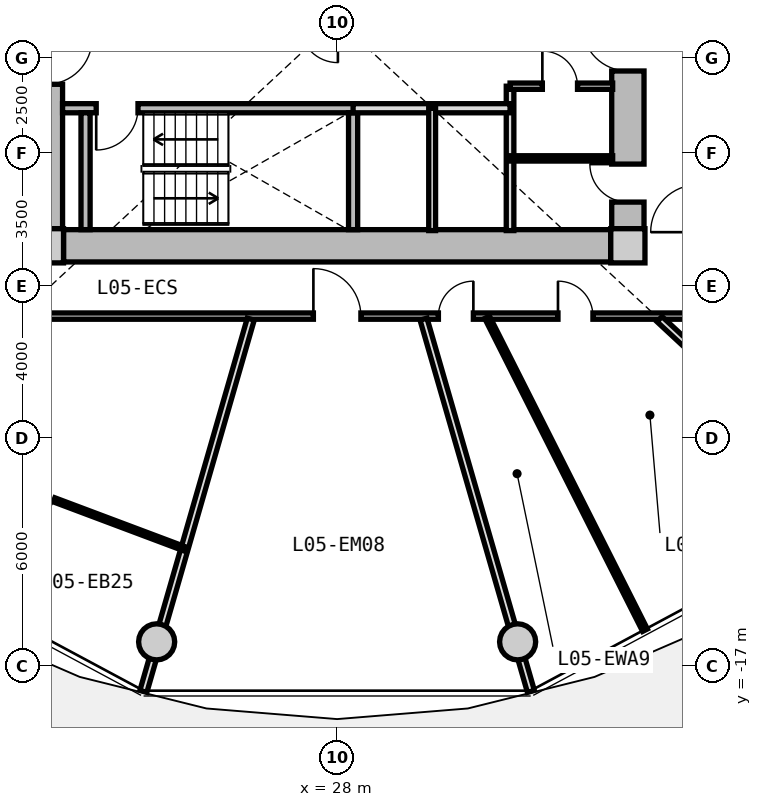
"""IFC4 building model, lengths in metres.
Left out: names, types, materials, properties, quantities, classifications, styles, units other than length and angle.
Written with IfcOpenShell. Run it as: python <this file> out.ifc"""

import sys

from ifc_helpers import new_model, si_unit, direction, frame, frame_2d, origin, origin_2d, place, context, subcontext, project, spatial, rectangle, circle, extrude, source, transform, mapped, element, fill, save


model = new_model("IFC4")
c1 = context("Model", 3, precision=1e-05, world=origin(), true_north=direction((0.0, 1.0)))
c2 = subcontext(c1, "Body", "Model", "MODEL_VIEW")
j1 = project(units=[si_unit("LENGTHUNIT", "METRE"), si_unit("PLANEANGLEUNIT", "RADIAN")], contexts=[c1])
p1 = place(None, origin())
s1 = spatial("IfcSite", under=j1, at=p1, CompositionType="ELEMENT")
p2 = place(p1, origin())
s2 = spatial("IfcBuilding", under=s1, at=p2, CompositionType="ELEMENT")
p3 = place(p2, frame((0.0, 0.0, 21.6)))
s3 = spatial("IfcBuildingStorey", under=s2, at=p3, CompositionType="ELEMENT", Elevation=21.6)
m1 = source(origin(), c2, "Body", "SweptSolid", [
    extrude(rectangle(XDim=0.9, YDim=0.9, at=origin_2d()), origin(), (0.0, 0.0, 1.0), 3.05),
])
for number, where, z_axis, x_axis in (
    (1, (20.35, -5.95, 0.0), (0.0, 0.0, 1.0), (1.0, 0.0, 0.0)),
    (2, (35.65, -5.95, 0.0), (0.0, 0.0, 1.0), (1.0, 0.0, 0.0)),
):
    element("IfcColumn", number, at=place(p3, frame(where, z_axis=z_axis, x_axis=x_axis)), inside=s3, PredefinedType="COLUMN", context=c2, shape_type="MappedRepresentation", body=[
        mapped(m1, transform((0.0, 0.0, 0.0), x_axis=(1.0, 0.0, 0.0), y_axis=(0.0, 1.0, 0.0), z_axis=(0.0, 0.0, 1.0), scale=1.0)),
    ])
m2 = source(origin(), c2, "Body", "SweptSolid", [
    extrude(rectangle(XDim=14.4, YDim=0.85, at=frame_2d((7.2, 0.0))), origin(), (0.0, 0.0, 1.0), 2.79),
])
p4 = place(p3, frame((35.2, -5.95, 0.0), z_axis=(0.0, 0.0, 1.0), x_axis=(-1.0, 0.0, 0.0)))
e3 = element("IfcWall", 3, at=p4, inside=s3, PredefinedType="SHEAR", context=c2, shape_type="MappedRepresentation", body=[
    mapped(m2, transform((0.0, 0.0, 0.0), x_axis=(1.0, 0.0, 0.0), y_axis=(0.0, 1.0, 0.0), z_axis=(0.0, 0.0, 1.0), scale=1.0)),
])
m3 = source(origin(), c2, "Body", "SweptSolid", [
    extrude(rectangle(XDim=11.0, YDim=0.85, at=frame_2d((5.5, 0.0))), origin(), (0.0, 0.0, 1.0), 2.79),
])
p5 = place(p3, frame((20.35, -5.5, 0.0), z_axis=(0.0, 0.0, 1.0), x_axis=(0.0, 1.0, 0.0)))
e4 = element("IfcWall", 4, at=p5, inside=s3, PredefinedType="SHEAR", context=c2, shape_type="MappedRepresentation", body=[
    mapped(m3, transform((0.0, 0.0, 0.0), x_axis=(1.0, 0.0, 0.0), y_axis=(0.0, 1.0, 0.0), z_axis=(0.0, 0.0, 1.0), scale=1.0)),
])
p6 = place(p5, frame((3.8, 0.0, 0.0)))
e5 = element("IfcOpeningElement", 5, at=p6, cuts=e4, PredefinedType="OPENING", context=c2, shape_type="SweptSolid", body=[
    extrude(rectangle(XDim=1.2, YDim=2.15, at=frame_2d((0.6, 1.075))), frame((0.0, 0.435, 0.0), z_axis=(0.0, -1.0, 0.0), x_axis=(1.0, 0.0, 0.0)), (0.0, 0.0, 1.0), 0.87),
])
p7 = place(p3, frame((35.65, 5.5, 0.0), z_axis=(0.0, 0.0, 1.0), x_axis=(0.0, -1.0, 0.0)))
e6 = element("IfcWall", 6, at=p7, inside=s3, PredefinedType="SHEAR", context=c2, shape_type="MappedRepresentation", body=[
    mapped(m3, transform((0.0, 0.0, 0.0), x_axis=(1.0, 0.0, 0.0), y_axis=(0.0, 1.0, 0.0), z_axis=(0.0, 0.0, 1.0), scale=1.0)),
])
p8 = place(p7, frame((5.65, 0.0, 0.0)))
e7 = element("IfcOpeningElement", 7, at=p8, cuts=e6, PredefinedType="OPENING", context=c2, shape_type="SweptSolid", body=[
    extrude(rectangle(XDim=1.2, YDim=2.15, at=frame_2d((0.6, 1.075))), frame((0.0, 0.435, 0.0), z_axis=(0.0, -1.0, 0.0), x_axis=(1.0, 0.0, 0.0)), (0.0, 0.0, 1.0), 0.87),
])
p9 = place(p7, frame((9.3, 0.0, 0.0)))
e8 = element("IfcOpeningElement", 8, at=p9, cuts=e6, PredefinedType="OPENING", context=c2, shape_type="SweptSolid", body=[
    extrude(rectangle(XDim=1.0, YDim=2.1, at=frame_2d((0.5, 1.05))), frame((0.0, 0.435, 0.0), z_axis=(0.0, -1.0, 0.0), x_axis=(1.0, 0.0, 0.0)), (0.0, 0.0, 1.0), 0.87),
])
m4 = source(origin(), c2, "Body", "SweptSolid", [
    extrude(circle(Radius=0.475, at=origin_2d()), origin(), (0.0, 0.0, 1.0), 3.47),
])
for number, where, z_axis, x_axis in (
    (9, (23.251, -16.373, -0.42), (0.0, 0.0, 1.0), (1.0, 0.0, 0.0)),
    (10, (32.749, -16.373, -0.42), (0.0, 0.0, 1.0), (1.0, 0.0, 0.0)),
):
    element("IfcColumn", number, at=place(p3, frame(where, z_axis=z_axis, x_axis=x_axis)), inside=s3, PredefinedType="COLUMN", context=c2, shape_type="MappedRepresentation", body=[
        mapped(m4, transform((0.0, 0.0, 0.0), x_axis=(1.0, 0.0, 0.0), y_axis=(0.0, 1.0, 0.0), z_axis=(0.0, 0.0, 1.0), scale=1.0)),
    ])
m5 = source(origin(), c2, "Body", "SweptSolid", [
    extrude(rectangle(XDim=7.765, YDim=0.24, at=frame_2d((3.883, 0.0))), origin(), (0.0, 0.0, 1.0), 2.79),
])
p10 = place(p3, frame((20.775, -2.33, 0.0), z_axis=(0.0, 0.0, 1.0), x_axis=(1.0, 0.0, 0.0)))
e11 = element("IfcWall", 11, at=p10, inside=s3, PredefinedType="PARTITIONING", context=c2, shape_type="MappedRepresentation", body=[
    mapped(m5, transform((0.0, 0.0, 0.0), x_axis=(1.0, 0.0, 0.0), y_axis=(0.0, 1.0, 0.0), z_axis=(0.0, 0.0, 1.0), scale=1.0)),
])
p11 = place(p10, frame((0.885, 0.0, 0.0)))
e12 = element("IfcOpeningElement", 12, at=p11, cuts=e11, PredefinedType="OPENING", context=c2, shape_type="SweptSolid", body=[
    extrude(rectangle(XDim=1.1, YDim=2.15, at=frame_2d((0.55, 1.075))), frame((0.0, 0.13, 0.0), z_axis=(0.0, -1.0, 0.0), x_axis=(1.0, 0.0, 0.0)), (0.0, 0.0, 1.0), 0.26),
])
m6 = source(origin(), c2, "Body", "SweptSolid", [
    extrude(rectangle(XDim=3.075, YDim=0.24, at=frame_2d((1.538, 0.0))), origin(), (0.0, 0.0, 1.0), 2.79),
])
for number, where, z_axis, x_axis in (
    (13, (21.38, -5.525, 0.0), (0.0, 0.0, 1.0), (0.0, 1.0, 0.0)),
    (14, (28.42, -5.525, 0.0), (0.0, 0.0, 1.0), (0.0, 1.0, 0.0)),
):
    element("IfcWall", number, at=place(p3, frame(where, z_axis=z_axis, x_axis=x_axis)), inside=s3, PredefinedType="PARTITIONING", context=c2, shape_type="MappedRepresentation", body=[
        mapped(m6, transform((0.0, 0.0, 0.0), x_axis=(1.0, 0.0, 0.0), y_axis=(0.0, 1.0, 0.0), z_axis=(0.0, 0.0, 1.0), scale=1.0)),
    ])
m7 = source(origin(), c2, "Body", "SweptSolid", [
    extrude(rectangle(XDim=3.8, YDim=0.2, at=frame_2d((1.9, 0.0))), origin(), (0.0, 0.0, 1.0), 2.775),
])
p12 = place(p3, frame((32.55, -5.55, 0.0), z_axis=(0.0, 0.0, 1.0), x_axis=(0.0, 1.0, 0.0)))
e15 = element("IfcWall", 15, at=p12, inside=s3, PredefinedType="PARTITIONING", context=c2, shape_type="MappedRepresentation", body=[
    mapped(m7, transform((0.0, 0.0, 0.0), x_axis=(1.0, 0.0, 0.0), y_axis=(0.0, 1.0, 0.0), z_axis=(0.0, 0.0, 1.0), scale=1.0)),
])
m8 = source(origin(), c2, "Body", "SweptSolid", [
    extrude(rectangle(XDim=4.13, YDim=0.24, at=frame_2d((2.065, 0.0))), origin(), (0.0, 0.0, 1.0), 2.775),
])
p13 = place(p3, frame((28.42, -2.33, 0.0), z_axis=(0.0, 0.0, 1.0), x_axis=(1.0, 0.0, 0.0)))
e16 = element("IfcWall", 16, at=p13, inside=s3, PredefinedType="PARTITIONING", context=c2, shape_type="MappedRepresentation", body=[
    mapped(m8, transform((0.0, 0.0, 0.0), x_axis=(1.0, 0.0, 0.0), y_axis=(0.0, 1.0, 0.0), z_axis=(0.0, 0.0, 1.0), scale=1.0)),
])
m9 = source(origin(), c2, "Body", "SweptSolid", [
    extrude(rectangle(XDim=3.22, YDim=0.18, at=frame_2d((1.61, 0.0))), origin(), (0.0, 0.0, 1.0), 2.775),
])
p14 = place(p3, frame((30.5, -5.55, 0.0), z_axis=(0.0, 0.0, 1.0), x_axis=(0.0, 1.0, 0.0)))
e17 = element("IfcWall", 17, at=p14, inside=s3, PredefinedType="PARTITIONING", context=c2, shape_type="MappedRepresentation", body=[
    mapped(m9, transform((0.0, 0.0, 0.0), x_axis=(1.0, 0.0, 0.0), y_axis=(0.0, 1.0, 0.0), z_axis=(0.0, 0.0, 1.0), scale=1.0)),
])
m10 = source(origin(), c2, "Body", "SweptSolid", [
    extrude(rectangle(XDim=2.7, YDim=0.165, at=frame_2d((1.35, 0.0))), origin(), (0.0, 0.0, 1.0), 2.775),
])
p15 = place(p3, frame((32.55, -1.75, 0.0), z_axis=(0.0, 0.0, 1.0), x_axis=(1.0, 0.0, 0.0)))
e18 = element("IfcWall", 18, at=p15, inside=s3, PredefinedType="PARTITIONING", context=c2, shape_type="MappedRepresentation", body=[
    mapped(m10, transform((0.0, 0.0, 0.0), x_axis=(1.0, 0.0, 0.0), y_axis=(0.0, 1.0, 0.0), z_axis=(0.0, 0.0, 1.0), scale=1.0)),
])
p16 = place(p15, frame((0.85, 0.0, 0.0)))
e19 = element("IfcOpeningElement", 19, at=p16, cuts=e18, PredefinedType="OPENING", context=c2, shape_type="SweptSolid", body=[
    extrude(rectangle(XDim=0.925, YDim=2.1, at=frame_2d((0.462, 1.05))), frame((0.0, 0.093, 0.0), z_axis=(0.0, -1.0, 0.0), x_axis=(1.0, 0.0, 0.0)), (0.0, 0.0, 1.0), 0.185),
])
m11 = source(origin(), c2, "Body", "SweptSolid", [
    extrude(rectangle(XDim=2.7, YDim=0.14, at=frame_2d((1.35, 0.0))), origin(), (0.0, 0.0, 1.0), 2.775),
])
p17 = place(p3, frame((32.55, -3.65, 0.0), z_axis=(0.0, 0.0, 1.0), x_axis=(1.0, 0.0, 0.0)))
e20 = element("IfcWall", 20, at=p17, inside=s3, PredefinedType="PARTITIONING", context=c2, shape_type="MappedRepresentation", body=[
    mapped(m11, transform((0.0, 0.0, 0.0), x_axis=(1.0, 0.0, 0.0), y_axis=(0.0, 1.0, 0.0), z_axis=(0.0, 0.0, 1.0), scale=1.0)),
])
m12 = source(origin(), c2, "Body", "SweptSolid", [
    extrude(rectangle(XDim=19.0, YDim=0.165, at=frame_2d((9.5, 0.0))), origin(), (0.0, 0.0, 1.0), 2.775),
])
p18 = place(p3, frame((37.5, -7.8, 0.0), z_axis=(0.0, 0.0, 1.0), x_axis=(-1.0, 0.0, 0.0)))
e21 = element("IfcWall", 21, at=p18, inside=s3, PredefinedType="PARTITIONING", context=c2, shape_type="MappedRepresentation", body=[
    mapped(m12, transform((0.0, 0.0, 0.0), x_axis=(1.0, 0.0, 0.0), y_axis=(0.0, 1.0, 0.0), z_axis=(0.0, 0.0, 1.0), scale=1.0)),
])
p19 = place(p18, frame((8.875, 0.0, 0.0)))
e22 = element("IfcOpeningElement", 22, at=p19, cuts=e21, PredefinedType="OPENING", context=c2, shape_type="SweptSolid", body=[
    extrude(rectangle(XDim=1.25, YDim=2.2, at=frame_2d((0.625, 1.1))), frame((0.0, 0.093, 0.0), z_axis=(0.0, -1.0, 0.0), x_axis=(1.0, 0.0, 0.0)), (0.0, 0.0, 1.0), 0.185),
])
p20 = place(p18, frame((5.915, 0.0, 0.0)))
e23 = element("IfcOpeningElement", 23, at=p20, cuts=e21, PredefinedType="OPENING", context=c2, shape_type="SweptSolid", body=[
    extrude(rectangle(XDim=0.92, YDim=2.1, at=frame_2d((0.46, 1.05))), frame((0.0, 0.093, 0.0), z_axis=(0.0, -1.0, 0.0), x_axis=(1.0, 0.0, 0.0)), (0.0, 0.0, 1.0), 0.185),
])
p21 = place(p18, frame((2.769, 0.0, 0.0)))
e24 = element("IfcOpeningElement", 24, at=p21, cuts=e21, PredefinedType="OPENING", context=c2, shape_type="SweptSolid", body=[
    extrude(rectangle(XDim=0.92, YDim=2.1, at=frame_2d((0.46, 1.05))), frame((0.0, 0.093, 0.0), z_axis=(0.0, -1.0, 0.0), x_axis=(1.0, 0.0, 0.0)), (0.0, 0.0, 1.0), 0.185),
])
m13 = source(origin(), c2, "Body", "SweptSolid", [
    extrude(rectangle(XDim=10.196, YDim=0.19, at=frame_2d((5.098, 0.0))), origin(), (0.0, 0.0, 1.0), 2.225),
])
p22 = place(p3, frame((25.727, -7.88, 0.0), z_axis=(0.0, 0.0, 1.0), x_axis=(-0.277136420347, -0.960830580549, 0.0)))
e25 = element("IfcWall", 25, at=p22, inside=s3, PredefinedType="PARTITIONING", context=c2, shape_type="MappedRepresentation", body=[
    mapped(m13, transform((0.0, 0.0, 0.0), x_axis=(1.0, 0.0, 0.0), y_axis=(0.0, 1.0, 0.0), z_axis=(0.0, 0.0, 1.0), scale=1.0)),
])
m14 = source(origin(), c2, "Body", "SweptSolid", [
    extrude(rectangle(XDim=8.32, YDim=0.115, at=frame_2d((4.16, 0.0))), origin(), (0.0, 0.0, 1.0), 2.775),
])
p23 = place(p3, frame((16.214, -11.006, 0.0), z_axis=(0.0, 0.0, 1.0), x_axis=(0.936180763098, -0.351518959382, 0.0)))
e26 = element("IfcWall", 26, at=p23, inside=s3, PredefinedType="PARTITIONING", context=c2, shape_type="MappedRepresentation", body=[
    mapped(m14, transform((0.0, 0.0, 0.0), x_axis=(1.0, 0.0, 0.0), y_axis=(0.0, 1.0, 0.0), z_axis=(0.0, 0.0, 1.0), scale=1.0)),
])
p24 = place(p23, frame((3.685, 0.0, 0.0)))
e27 = element("IfcOpeningElement", 27, at=p24, cuts=e26, PredefinedType="OPENING", context=c2, shape_type="SweptSolid", body=[
    extrude(rectangle(XDim=0.95, YDim=2.1, at=frame_2d((0.475, 1.05))), frame((0.0, 0.067, 0.0), z_axis=(0.0, -1.0, 0.0), x_axis=(1.0, 0.0, 0.0)), (0.0, 0.0, 1.0), 0.135),
])
p25 = place(p3, frame((30.273, -7.88, 0.0), z_axis=(0.0, 0.0, 1.0), x_axis=(0.277136420347, -0.960830580549, 0.0)))
e28 = element("IfcWall", 28, at=p25, inside=s3, PredefinedType="PARTITIONING", context=c2, shape_type="MappedRepresentation", body=[
    mapped(m13, transform((0.0, 0.0, 0.0), x_axis=(1.0, 0.0, 0.0), y_axis=(0.0, 1.0, 0.0), z_axis=(0.0, 0.0, 1.0), scale=1.0)),
])
m15 = source(origin(), c2, "Body", "SweptSolid", [
    extrude(rectangle(XDim=7.435, YDim=0.19, at=frame_2d((3.717, 0.0))), origin(), (0.0, 0.0, 1.0), 2.225),
])
p26 = place(p3, frame((36.483, -7.88, 0.0), z_axis=(0.0, 0.0, 1.0), x_axis=(0.732651956848, -0.680603489652, 0.0)))
e29 = element("IfcWall", 29, at=p26, inside=s3, PredefinedType="PARTITIONING", context=c2, shape_type="MappedRepresentation", body=[
    mapped(m15, transform((0.0, 0.0, 0.0), x_axis=(1.0, 0.0, 0.0), y_axis=(0.0, 1.0, 0.0), z_axis=(0.0, 0.0, 1.0), scale=1.0)),
])
m16 = source(origin(), c2, "Body", "SweptSolid", [
    extrude(rectangle(XDim=9.225, YDim=0.14, at=frame_2d((4.613, 0.0))), origin(), (0.0, 0.0, 1.0), 2.775),
])
p27 = place(p3, frame((31.946, -7.83, 0.0), z_axis=(0.0, 0.0, 1.0), x_axis=(0.450460543767, -0.892796336523, 0.0)))
e30 = element("IfcWall", 30, at=p27, inside=s3, PredefinedType="PARTITIONING", context=c2, shape_type="MappedRepresentation", body=[
    mapped(m16, transform((0.0, 0.0, 0.0), x_axis=(1.0, 0.0, 0.0), y_axis=(0.0, 1.0, 0.0), z_axis=(0.0, 0.0, 1.0), scale=1.0)),
])
m17 = source(origin(), c2, "Body", "SweptSolid", [
    extrude(rectangle(XDim=1.1, YDim=2.15, at=frame_2d((0.55, 1.075))), frame((0.0, 0.025, 0.0), z_axis=(0.0, -1.0, 0.0), x_axis=(1.0, 0.0, 0.0)), (0.0, 0.0, 1.0), 0.05),
])
p28 = place(p11, frame((1.1, 0.0, 0.0), z_axis=(0.0, 0.0, 1.0), x_axis=(-1.0, 0.0, 0.0)))
e31 = element("IfcDoor", 31, at=p28, inside=s3, OperationType="SINGLE_SWING_RIGHT", PredefinedType="DOOR", context=c2, shape_type="MappedRepresentation", body=[
    mapped(m17, transform((0.0, 0.0, 0.0), x_axis=(1.0, 0.0, 0.0), y_axis=(0.0, 1.0, 0.0), z_axis=(0.0, 0.0, 1.0), scale=1.0)),
])
fill(e12, e31)
m18 = source(origin(), c2, "Body", "SweptSolid", [
    extrude(rectangle(XDim=1.2, YDim=2.15, at=frame_2d((0.6, 1.075))), frame((0.0, 0.025, 0.0), z_axis=(0.0, -1.0, 0.0), x_axis=(1.0, 0.0, 0.0)), (0.0, 0.0, 1.0), 0.05),
])
p29 = place(p8, frame((1.2, 0.0, 0.0), z_axis=(0.0, 0.0, 1.0), x_axis=(-1.0, 0.0, 0.0)))
e32 = element("IfcDoor", 32, at=p29, inside=s3, OperationType="SINGLE_SWING_RIGHT", PredefinedType="DOOR", context=c2, shape_type="MappedRepresentation", body=[
    mapped(m18, transform((0.0, 0.0, 0.0), x_axis=(1.0, 0.0, 0.0), y_axis=(0.0, 1.0, 0.0), z_axis=(0.0, 0.0, 1.0), scale=1.0)),
])
fill(e7, e32)
m19 = source(origin(), c2, "Body", "SweptSolid", [
    extrude(rectangle(XDim=0.925, YDim=2.1, at=frame_2d((0.462, 1.05))), frame((0.0, 0.025, 0.0), z_axis=(0.0, -1.0, 0.0), x_axis=(1.0, 0.0, 0.0)), (0.0, 0.0, 1.0), 0.05),
])
p30 = place(p16, origin())
e33 = element("IfcDoor", 33, at=p30, inside=s3, OperationType="SINGLE_SWING_LEFT", PredefinedType="DOOR", context=c2, shape_type="MappedRepresentation", body=[
    mapped(m19, transform((0.0, 0.0, 0.0), x_axis=(1.0, 0.0, 0.0), y_axis=(0.0, 1.0, 0.0), z_axis=(0.0, 0.0, 1.0), scale=1.0)),
])
fill(e19, e33)
m20 = source(origin(), c2, "Body", "SweptSolid", [
    extrude(rectangle(XDim=1.0, YDim=2.1, at=frame_2d((0.5, 1.05))), frame((0.0, 0.025, 0.0), z_axis=(0.0, -1.0, 0.0), x_axis=(1.0, 0.0, 0.0)), (0.0, 0.0, 1.0), 0.05),
])
p31 = place(p9, frame((1.0, 0.0, 0.0), z_axis=(0.0, 0.0, 1.0), x_axis=(-1.0, 0.0, 0.0)))
e34 = element("IfcDoor", 34, at=p31, inside=s3, OperationType="SINGLE_SWING_RIGHT", PredefinedType="DOOR", context=c2, shape_type="MappedRepresentation", body=[
    mapped(m20, transform((0.0, 0.0, 0.0), x_axis=(1.0, 0.0, 0.0), y_axis=(0.0, 1.0, 0.0), z_axis=(0.0, 0.0, 1.0), scale=1.0)),
])
fill(e8, e34)
m21 = source(origin(), c2, "Body", "SweptSolid", [
    extrude(rectangle(XDim=0.95, YDim=2.1, at=frame_2d((0.475, 1.05))), frame((0.0, 0.025, 0.0), z_axis=(0.0, -1.0, 0.0), x_axis=(1.0, 0.0, 0.0)), (0.0, 0.0, 1.0), 0.05),
])
p32 = place(p24, frame((0.95, 0.0, 0.0), z_axis=(0.0, 0.0, 1.0), x_axis=(-1.0, 0.0, 0.0)))
e35 = element("IfcDoor", 35, at=p32, inside=s3, OperationType="SINGLE_SWING_RIGHT", PredefinedType="DOOR", context=c2, shape_type="MappedRepresentation", body=[
    mapped(m21, transform((0.0, 0.0, 0.0), x_axis=(1.0, 0.0, 0.0), y_axis=(0.0, 1.0, 0.0), z_axis=(0.0, 0.0, 1.0), scale=1.0)),
])
fill(e27, e35)
m22 = source(origin(), c2, "Body", "SweptSolid", [
    extrude(rectangle(XDim=1.25, YDim=2.2, at=frame_2d((0.625, 1.1))), frame((0.0, 0.025, 0.0), z_axis=(0.0, -1.0, 0.0), x_axis=(1.0, 0.0, 0.0)), (0.0, 0.0, 1.0), 0.05),
])
p33 = place(p19, frame((1.25, 0.0, 0.0), z_axis=(0.0, 0.0, 1.0), x_axis=(-1.0, 0.0, 0.0)))
e36 = element("IfcDoor", 36, at=p33, inside=s3, OperationType="SINGLE_SWING_LEFT", PredefinedType="DOOR", context=c2, shape_type="MappedRepresentation", body=[
    mapped(m22, transform((0.0, 0.0, 0.0), x_axis=(1.0, 0.0, 0.0), y_axis=(0.0, 1.0, 0.0), z_axis=(0.0, 0.0, 1.0), scale=1.0)),
])
fill(e22, e36)
m23 = source(origin(), c2, "Body", "SweptSolid", [
    extrude(rectangle(XDim=0.92, YDim=2.1, at=frame_2d((0.46, 1.05))), frame((0.0, 0.025, 0.0), z_axis=(0.0, -1.0, 0.0), x_axis=(1.0, 0.0, 0.0)), (0.0, 0.0, 1.0), 0.05),
])
p34 = place(p20, frame((0.92, 0.0, 0.0), z_axis=(0.0, 0.0, 1.0), x_axis=(-1.0, 0.0, 0.0)))
e37 = element("IfcDoor", 37, at=p34, inside=s3, OperationType="SINGLE_SWING_RIGHT", PredefinedType="DOOR", context=c2, shape_type="MappedRepresentation", body=[
    mapped(m23, transform((0.0, 0.0, 0.0), x_axis=(1.0, 0.0, 0.0), y_axis=(0.0, 1.0, 0.0), z_axis=(0.0, 0.0, 1.0), scale=1.0)),
])
fill(e23, e37)
p35 = place(p21, frame((0.92, 0.0, 0.0), z_axis=(0.0, 0.0, 1.0), x_axis=(-1.0, 0.0, 0.0)))
e38 = element("IfcDoor", 38, at=p35, inside=s3, OperationType="SINGLE_SWING_LEFT", PredefinedType="DOOR", context=c2, shape_type="MappedRepresentation", body=[
    mapped(m23, transform((0.0, 0.0, 0.0), x_axis=(1.0, 0.0, 0.0), y_axis=(0.0, 1.0, 0.0), z_axis=(0.0, 0.0, 1.0), scale=1.0)),
])
fill(e24, e38)
save(model, sys.argv[1])
